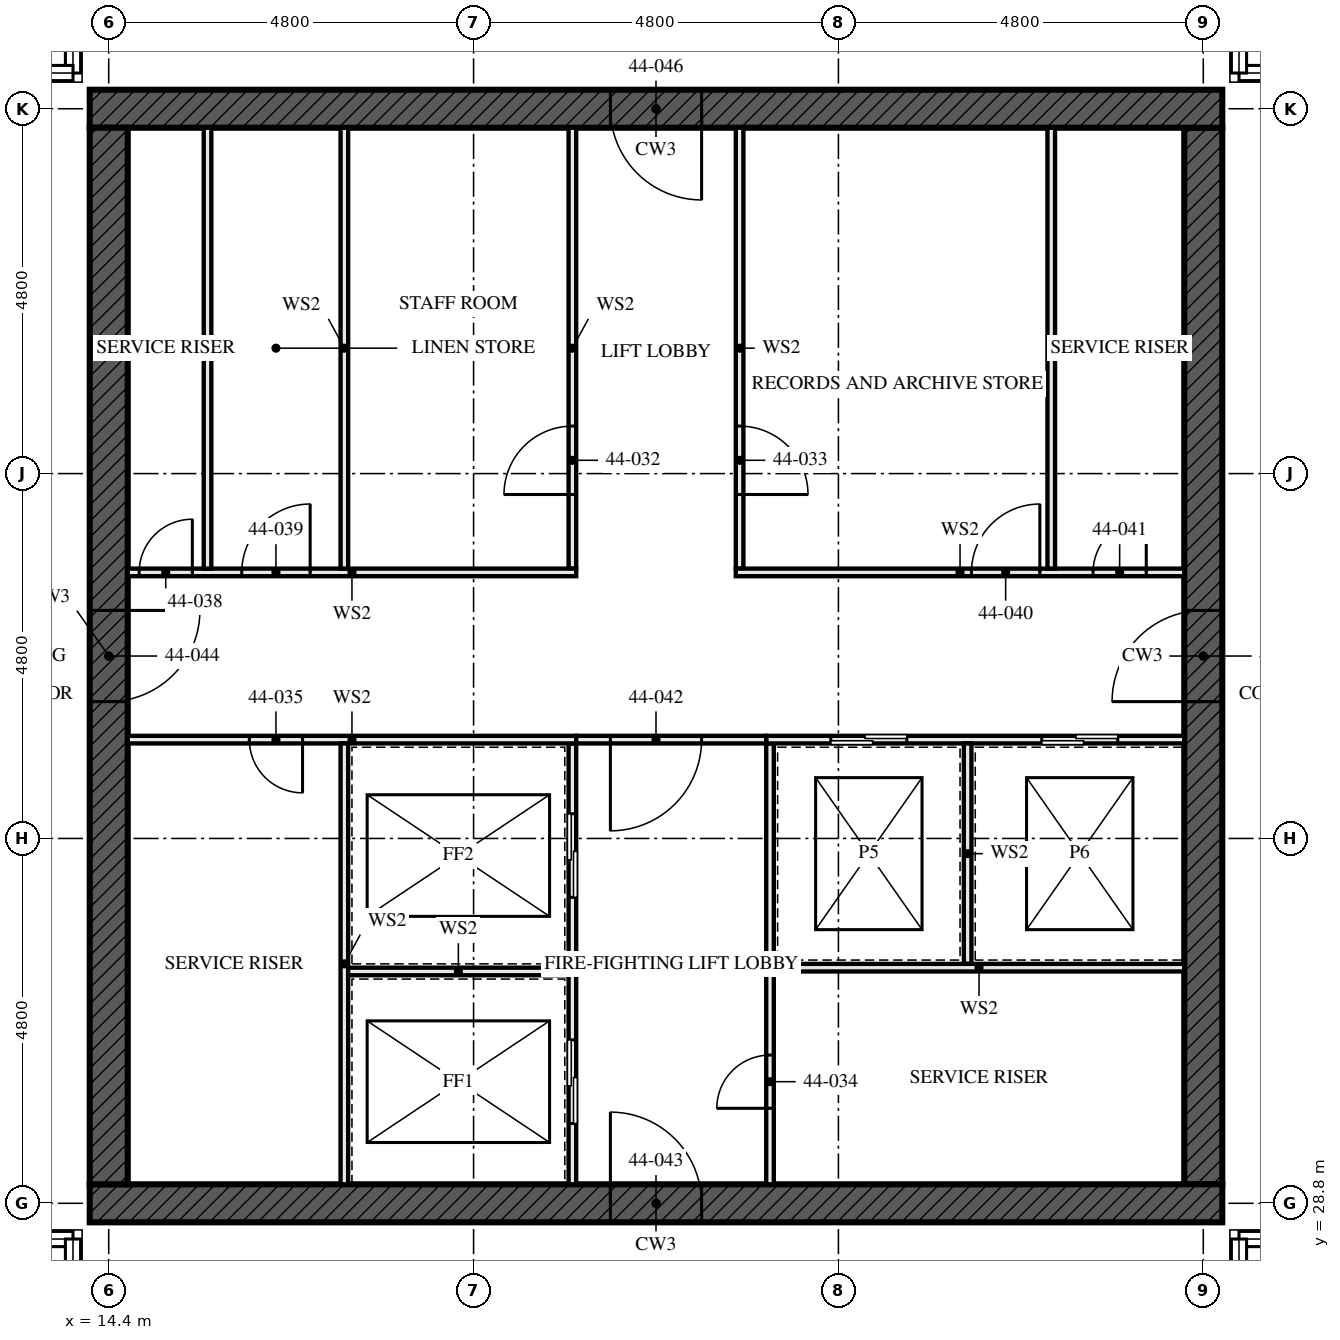
"""IFC4 building model, lengths in metres.
Left out: names, types, materials, properties, quantities, classifications, styles, units other than length and angle.
Written with IfcOpenShell. Run it as: python <this file> out.ifc"""

import sys

from ifc_helpers import new_model, si_unit, direction, frame, frame_2d, origin, place, context, subcontext, project, spatial, rectangle, extrude, element, fill, save


model = new_model("IFC4")
c1 = context("Model", 3, precision=1e-05, world=origin(), true_north=direction((0.0, 1.0)))
c2 = subcontext(c1, "Body", "Model", "MODEL_VIEW")
j1 = project(units=[si_unit("LENGTHUNIT", "METRE"), si_unit("PLANEANGLEUNIT", "RADIAN")], contexts=[c1])
p1 = place(None, origin())
s1 = spatial("IfcSite", under=j1, at=p1, CompositionType="ELEMENT")
p2 = place(p1, origin())
s2 = spatial("IfcBuilding", under=s1, at=p2, CompositionType="ELEMENT")
p3 = place(p2, frame((0.0, 0.0, 162.0)))
s3 = spatial("IfcBuildingStorey", under=s2, at=p3, CompositionType="ELEMENT", Elevation=162.0)
p4 = place(p3, frame((14.15, 28.8, -0.17), z_axis=(0.0, 0.0, 1.0), x_axis=(1.0, 0.0, 0.0)))
e1 = element("IfcWall", 1, at=p4, inside=s3, PredefinedType="SHEAR", context=c2, shape_type="SweptSolid", body=[
    extrude(rectangle(XDim=14.9, YDim=0.5, at=frame_2d((7.45, 0.0))), origin(), (0.0, 0.0, 1.0), 3.5),
])
p5 = place(p4, frame((6.85, 0.0, 0.17)))
e2 = element("IfcOpeningElement", 2, at=p5, cuts=e1, PredefinedType="OPENING", context=c2, shape_type="SweptSolid", body=[
    extrude(rectangle(XDim=1.2, YDim=2.1, at=frame_2d((0.6, 1.05))), frame((0.0, 0.26, 0.0), z_axis=(0.0, -1.0, 0.0), x_axis=(1.0, 0.0, 0.0)), (0.0, 0.0, 1.0), 0.521),
])
p6 = place(p3, frame((29.05, 43.2, -0.17), z_axis=(0.0, 0.0, 1.0), x_axis=(-1.0, 0.0, 0.0)))
e3 = element("IfcWall", 3, at=p6, inside=s3, PredefinedType="SHEAR", context=c2, shape_type="SweptSolid", body=[
    extrude(rectangle(XDim=14.9, YDim=0.5, at=frame_2d((7.45, 0.0))), origin(), (0.0, 0.0, 1.0), 3.5),
])
p7 = place(p6, frame((6.85, 0.0, 0.17)))
e4 = element("IfcOpeningElement", 4, at=p7, cuts=e3, PredefinedType="OPENING", context=c2, shape_type="SweptSolid", body=[
    extrude(rectangle(XDim=1.2, YDim=2.1, at=frame_2d((0.6, 1.05))), frame((0.0, 0.26, 0.0), z_axis=(0.0, -1.0, 0.0), x_axis=(1.0, 0.0, 0.0)), (0.0, 0.0, 1.0), 0.521),
])
p8 = place(p3, frame((14.4, 42.95, -0.17), z_axis=(0.0, 0.0, 1.0), x_axis=(0.0, -1.0, 0.0)))
e5 = element("IfcWall", 5, at=p8, inside=s3, PredefinedType="SHEAR", context=c2, shape_type="SweptSolid", body=[
    extrude(rectangle(XDim=13.9, YDim=0.5, at=frame_2d((6.95, 0.0))), origin(), (0.0, 0.0, 1.0), 3.5),
])
p9 = place(p8, frame((6.35, 0.0, 0.17)))
e6 = element("IfcOpeningElement", 6, at=p9, cuts=e5, PredefinedType="OPENING", context=c2, shape_type="SweptSolid", body=[
    extrude(rectangle(XDim=1.2, YDim=2.1, at=frame_2d((0.6, 1.05))), frame((0.0, 0.26, 0.0), z_axis=(0.0, -1.0, 0.0), x_axis=(1.0, 0.0, 0.0)), (0.0, 0.0, 1.0), 0.521),
])
p10 = place(p3, frame((28.8, 29.05, -0.17), z_axis=(0.0, 0.0, 1.0), x_axis=(0.0, 1.0, 0.0)))
e7 = element("IfcWall", 7, at=p10, inside=s3, PredefinedType="SHEAR", context=c2, shape_type="SweptSolid", body=[
    extrude(rectangle(XDim=13.9, YDim=0.5, at=frame_2d((6.95, 0.0))), origin(), (0.0, 0.0, 1.0), 3.5),
])
p11 = place(p10, frame((6.35, 0.0, 0.17)))
e8 = element("IfcOpeningElement", 8, at=p11, cuts=e7, PredefinedType="OPENING", context=c2, shape_type="SweptSolid", body=[
    extrude(rectangle(XDim=1.2, YDim=2.1, at=frame_2d((0.6, 1.05))), frame((0.0, 0.26, 0.0), z_axis=(0.0, -1.0, 0.0), x_axis=(1.0, 0.0, 0.0)), (0.0, 0.0, 1.0), 0.521),
])
for number, where, z_axis, x_axis in (
    (9, (15.7, 37.15, 0.0), (0.0, 0.0, 1.0), (0.0, 1.0, 0.0)),
    (10, (26.8, 37.15, 0.0), (0.0, 0.0, 1.0), (0.0, 1.0, 0.0)),
):
    element("IfcWall", number, at=place(p3, frame(where, z_axis=z_axis, x_axis=x_axis)), inside=s3, PredefinedType="SOLIDWALL", context=c2, shape_type="SweptSolid", body=[
        extrude(rectangle(XDim=5.8, YDim=0.1, at=frame_2d((2.9, 0.0))), origin(), (0.0, 0.0, 1.0), 3.33),
    ])
p12 = place(p3, frame((20.5, 29.05, 0.0), z_axis=(0.0, 0.0, 1.0), x_axis=(0.0, 1.0, 0.0)))
e11 = element("IfcWall", 11, at=p12, inside=s3, PredefinedType="SOLIDWALL", context=c2, shape_type="SweptSolid", body=[
    extrude(rectangle(XDim=5.8, YDim=0.1, at=frame_2d((2.9, 0.0))), origin(), (0.0, 0.0, 1.0), 3.33),
])
p13 = place(p12, frame((0.8, 0.0, 0.0)))
e12 = element("IfcOpeningElement", 12, at=p13, cuts=e11, PredefinedType="OPENING", context=c2, shape_type="SweptSolid", body=[
    extrude(rectangle(XDim=1.1, YDim=2.3, at=frame_2d((0.55, 1.15))), frame((0.0, 0.061, 0.0), z_axis=(0.0, -1.0, 0.0), x_axis=(1.0, 0.0, 0.0)), (0.0, 0.0, 1.0), 0.121),
])
p14 = place(p12, frame((3.775, 0.0, 0.0)))
e13 = element("IfcOpeningElement", 13, at=p14, cuts=e11, PredefinedType="OPENING", context=c2, shape_type="SweptSolid", body=[
    extrude(rectangle(XDim=1.1, YDim=2.3, at=frame_2d((0.55, 1.15))), frame((0.0, 0.061, 0.0), z_axis=(0.0, -1.0, 0.0), x_axis=(1.0, 0.0, 0.0)), (0.0, 0.0, 1.0), 0.121),
])
p15 = place(p3, frame((20.5, 37.15, 0.0), z_axis=(0.0, 0.0, 1.0), x_axis=(0.0, 1.0, 0.0)))
e14 = element("IfcWall", 14, at=p15, inside=s3, PredefinedType="SOLIDWALL", context=c2, shape_type="SweptSolid", body=[
    extrude(rectangle(XDim=5.8, YDim=0.1, at=frame_2d((2.9, 0.0))), origin(), (0.0, 0.0, 1.0), 3.33),
])
p16 = place(p15, frame((0.975, 0.0, 0.0)))
e15 = element("IfcOpeningElement", 15, at=p16, cuts=e14, PredefinedType="OPENING", context=c2, shape_type="SweptSolid", body=[
    extrude(rectangle(XDim=0.9, YDim=2.1, at=frame_2d((0.45, 1.05))), frame((0.0, 0.061, 0.0), z_axis=(0.0, -1.0, 0.0), x_axis=(1.0, 0.0, 0.0)), (0.0, 0.0, 1.0), 0.121),
])
p17 = place(p3, frame((22.7, 37.15, 0.0), z_axis=(0.0, 0.0, 1.0), x_axis=(0.0, 1.0, 0.0)))
e16 = element("IfcWall", 16, at=p17, inside=s3, PredefinedType="SOLIDWALL", context=c2, shape_type="SweptSolid", body=[
    extrude(rectangle(XDim=5.8, YDim=0.1, at=frame_2d((2.9, 0.0))), origin(), (0.0, 0.0, 1.0), 3.33),
])
p18 = place(p17, frame((0.975, 0.0, 0.0)))
e17 = element("IfcOpeningElement", 17, at=p18, cuts=e16, PredefinedType="OPENING", context=c2, shape_type="SweptSolid", body=[
    extrude(rectangle(XDim=0.9, YDim=2.1, at=frame_2d((0.45, 1.05))), frame((0.0, 0.061, 0.0), z_axis=(0.0, -1.0, 0.0), x_axis=(1.0, 0.0, 0.0)), (0.0, 0.0, 1.0), 0.121),
])
p19 = place(p3, frame((23.1, 29.05, 0.0), z_axis=(0.0, 0.0, 1.0), x_axis=(0.0, 1.0, 0.0)))
e18 = element("IfcWall", 18, at=p19, inside=s3, PredefinedType="SOLIDWALL", context=c2, shape_type="SweptSolid", body=[
    extrude(rectangle(XDim=5.8, YDim=0.1, at=frame_2d((2.9, 0.0))), origin(), (0.0, 0.0, 1.0), 3.33),
])
p20 = place(p19, frame((1.0, 0.0, 0.0)))
e19 = element("IfcOpeningElement", 19, at=p20, cuts=e18, PredefinedType="OPENING", context=c2, shape_type="SweptSolid", body=[
    extrude(rectangle(XDim=0.7, YDim=2.1, at=frame_2d((0.35, 1.05))), frame((0.0, 0.061, 0.0), z_axis=(0.0, -1.0, 0.0), x_axis=(1.0, 0.0, 0.0)), (0.0, 0.0, 1.0), 0.121),
])
p21 = place(p3, frame((14.65, 34.9, 0.0), z_axis=(0.0, 0.0, 1.0), x_axis=(1.0, 0.0, 0.0)))
e20 = element("IfcWall", 20, at=p21, inside=s3, PredefinedType="SOLIDWALL", context=c2, shape_type="SweptSolid", body=[
    extrude(rectangle(XDim=5.9, YDim=0.1, at=frame_2d((2.95, 0.0))), origin(), (0.0, 0.0, 1.0), 3.33),
])
p22 = place(p21, frame((1.6, 0.0, 0.0)))
e21 = element("IfcOpeningElement", 21, at=p22, cuts=e20, PredefinedType="OPENING", context=c2, shape_type="SweptSolid", body=[
    extrude(rectangle(XDim=0.7, YDim=2.1, at=frame_2d((0.35, 1.05))), frame((0.0, 0.061, 0.0), z_axis=(0.0, -1.0, 0.0), x_axis=(1.0, 0.0, 0.0)), (0.0, 0.0, 1.0), 0.121),
])
p23 = place(p3, frame((23.05, 34.9, 0.0), z_axis=(0.0, 0.0, 1.0), x_axis=(1.0, 0.0, 0.0)))
e22 = element("IfcWall", 22, at=p23, inside=s3, PredefinedType="SOLIDWALL", context=c2, shape_type="SweptSolid", body=[
    extrude(rectangle(XDim=5.5, YDim=0.1, at=frame_2d((2.75, 0.0))), origin(), (0.0, 0.0, 1.0), 3.33),
])
p24 = place(p23, frame((0.85, 0.0, 0.0)))
e23 = element("IfcOpeningElement", 23, at=p24, cuts=e22, PredefinedType="OPENING", context=c2, shape_type="SweptSolid", body=[
    extrude(rectangle(XDim=1.0, YDim=2.1, at=frame_2d((0.5, 1.05))), frame((0.0, 0.061, 0.0), z_axis=(0.0, -1.0, 0.0), x_axis=(1.0, 0.0, 0.0)), (0.0, 0.0, 1.0), 0.121),
])
p25 = place(p23, frame((3.625, 0.0, 0.0)))
e24 = element("IfcOpeningElement", 24, at=p25, cuts=e22, PredefinedType="OPENING", context=c2, shape_type="SweptSolid", body=[
    extrude(rectangle(XDim=1.0, YDim=2.1, at=frame_2d((0.5, 1.05))), frame((0.0, 0.061, 0.0), z_axis=(0.0, -1.0, 0.0), x_axis=(1.0, 0.0, 0.0)), (0.0, 0.0, 1.0), 0.121),
])
p26 = place(p3, frame((14.65, 37.1, 0.0), z_axis=(0.0, 0.0, 1.0), x_axis=(1.0, 0.0, 0.0)))
e25 = element("IfcWall", 25, at=p26, inside=s3, PredefinedType="SOLIDWALL", context=c2, shape_type="SweptSolid", body=[
    extrude(rectangle(XDim=5.9, YDim=0.1, at=frame_2d((2.95, 0.0))), origin(), (0.0, 0.0, 1.0), 3.33),
])
p27 = place(p26, frame((0.15, 0.0, 0.0)))
e26 = element("IfcOpeningElement", 26, at=p27, cuts=e25, PredefinedType="OPENING", context=c2, shape_type="SweptSolid", body=[
    extrude(rectangle(XDim=0.7, YDim=2.1, at=frame_2d((0.35, 1.05))), frame((0.0, 0.061, 0.0), z_axis=(0.0, -1.0, 0.0), x_axis=(1.0, 0.0, 0.0)), (0.0, 0.0, 1.0), 0.121),
])
p28 = place(p26, frame((1.5, 0.0, 0.0)))
e27 = element("IfcOpeningElement", 27, at=p28, cuts=e25, PredefinedType="OPENING", context=c2, shape_type="SweptSolid", body=[
    extrude(rectangle(XDim=0.9, YDim=2.1, at=frame_2d((0.45, 1.05))), frame((0.0, 0.061, 0.0), z_axis=(0.0, -1.0, 0.0), x_axis=(1.0, 0.0, 0.0)), (0.0, 0.0, 1.0), 0.121),
])
p29 = place(p3, frame((22.65, 37.1, 0.0), z_axis=(0.0, 0.0, 1.0), x_axis=(1.0, 0.0, 0.0)))
e28 = element("IfcWall", 28, at=p29, inside=s3, PredefinedType="SOLIDWALL", context=c2, shape_type="SweptSolid", body=[
    extrude(rectangle(XDim=5.9, YDim=0.1, at=frame_2d((2.95, 0.0))), origin(), (0.0, 0.0, 1.0), 3.33),
])
p30 = place(p29, frame((3.1, 0.0, 0.0)))
e29 = element("IfcOpeningElement", 29, at=p30, cuts=e28, PredefinedType="OPENING", context=c2, shape_type="SweptSolid", body=[
    extrude(rectangle(XDim=0.9, YDim=2.1, at=frame_2d((0.45, 1.05))), frame((0.0, 0.061, 0.0), z_axis=(0.0, -1.0, 0.0), x_axis=(1.0, 0.0, 0.0)), (0.0, 0.0, 1.0), 0.121),
])
p31 = place(p29, frame((4.7, 0.0, 0.0)))
e30 = element("IfcOpeningElement", 30, at=p31, cuts=e28, PredefinedType="OPENING", context=c2, shape_type="SweptSolid", body=[
    extrude(rectangle(XDim=0.7, YDim=2.1, at=frame_2d((0.35, 1.05))), frame((0.0, 0.061, 0.0), z_axis=(0.0, -1.0, 0.0), x_axis=(1.0, 0.0, 0.0)), (0.0, 0.0, 1.0), 0.121),
])
p32 = place(p3, frame((20.55, 34.9, 0.0), z_axis=(0.0, 0.0, 1.0), x_axis=(1.0, 0.0, 0.0)))
e31 = element("IfcWall", 31, at=p32, inside=s3, PredefinedType="SOLIDWALL", context=c2, shape_type="SweptSolid", body=[
    extrude(rectangle(XDim=2.5, YDim=0.1, at=frame_2d((1.25, 0.0))), origin(), (0.0, 0.0, 1.0), 3.33),
])
p33 = place(p32, frame((0.45, 0.0, 0.0)))
e32 = element("IfcOpeningElement", 32, at=p33, cuts=e31, PredefinedType="OPENING", context=c2, shape_type="SweptSolid", body=[
    extrude(rectangle(XDim=1.2, YDim=2.1, at=frame_2d((0.6, 1.05))), frame((0.0, 0.061, 0.0), z_axis=(0.0, -1.0, 0.0), x_axis=(1.0, 0.0, 0.0)), (0.0, 0.0, 1.0), 0.121),
])
p34 = place(p3, frame((17.5, 29.05, 0.0), z_axis=(0.0, 0.0, 1.0), x_axis=(0.0, 1.0, 0.0)))
e33 = element("IfcWall", 33, at=p34, inside=s3, PredefinedType="SOLIDWALL", context=c2, shape_type="SweptSolid", body=[
    extrude(rectangle(XDim=5.8, YDim=0.1, at=frame_2d((2.9, 0.0))), origin(), (0.0, 0.0, 1.0), 3.33),
])
p35 = place(p3, frame((17.55, 31.85, 0.0), z_axis=(0.0, 0.0, 1.0), x_axis=(1.0, 0.0, 0.0)))
e34 = element("IfcWall", 34, at=p35, inside=s3, PredefinedType="SOLIDWALL", context=c2, shape_type="SweptSolid", body=[
    extrude(rectangle(XDim=2.9, YDim=0.1, at=frame_2d((1.45, 0.0))), origin(), (0.0, 0.0, 1.0), 3.33),
])
p36 = place(p3, frame((17.5, 37.15, 0.0), z_axis=(0.0, 0.0, 1.0), x_axis=(0.0, 1.0, 0.0)))
e35 = element("IfcWall", 35, at=p36, inside=s3, PredefinedType="SOLIDWALL", context=c2, shape_type="SweptSolid", body=[
    extrude(rectangle(XDim=5.8, YDim=0.1, at=frame_2d((2.9, 0.0))), origin(), (0.0, 0.0, 1.0), 3.33),
])
p37 = place(p3, frame((25.7, 31.95, 0.0), z_axis=(0.0, 0.0, 1.0), x_axis=(0.0, 1.0, 0.0)))
e36 = element("IfcWall", 36, at=p37, inside=s3, PredefinedType="SOLIDWALL", context=c2, shape_type="SweptSolid", body=[
    extrude(rectangle(XDim=2.9, YDim=0.1, at=frame_2d((1.45, 0.0))), origin(), (0.0, 0.0, 1.0), 3.33),
])
p38 = place(p3, frame((23.15, 31.9, 0.0), z_axis=(0.0, 0.0, 1.0), x_axis=(1.0, 0.0, 0.0)))
e37 = element("IfcWall", 37, at=p38, inside=s3, PredefinedType="SOLIDWALL", context=c2, shape_type="SweptSolid", body=[
    extrude(rectangle(XDim=5.4, YDim=0.1, at=frame_2d((2.7, 0.0))), origin(), (0.0, 0.0, 1.0), 3.33),
])
p39 = place(p13, origin())
e38 = element("IfcDoor", 38, at=p39, inside=s3, OperationType="SLIDING_TO_LEFT", PredefinedType="DOOR", context=c2, shape_type="SweptSolid", body=[
    extrude(rectangle(XDim=1.1, YDim=2.3, at=frame_2d((0.55, 1.15))), frame((0.0, 0.05, 0.0), z_axis=(0.0, -1.0, 0.0), x_axis=(1.0, 0.0, 0.0)), (0.0, 0.0, 1.0), 0.1),
])
fill(e12, e38)
p40 = place(p14, origin())
e39 = element("IfcDoor", 39, at=p40, inside=s3, OperationType="SLIDING_TO_LEFT", PredefinedType="DOOR", context=c2, shape_type="SweptSolid", body=[
    extrude(rectangle(XDim=1.1, YDim=2.3, at=frame_2d((0.55, 1.15))), frame((0.0, 0.05, 0.0), z_axis=(0.0, -1.0, 0.0), x_axis=(1.0, 0.0, 0.0)), (0.0, 0.0, 1.0), 0.1),
])
fill(e13, e39)
p41 = place(p16, origin())
e40 = element("IfcDoor", 40, at=p41, inside=s3, OperationType="SINGLE_SWING_RIGHT", PredefinedType="DOOR", context=c2, shape_type="SweptSolid", body=[
    extrude(rectangle(XDim=0.9, YDim=2.1, at=frame_2d((0.45, 1.05))), frame((0.0, 0.027, 0.0), z_axis=(0.0, -1.0, 0.0), x_axis=(1.0, 0.0, 0.0)), (0.0, 0.0, 1.0), 0.054),
])
fill(e15, e40)
p42 = place(p18, frame((0.9, 0.0, 0.0), z_axis=(0.0, 0.0, 1.0), x_axis=(-1.0, 0.0, 0.0)))
e41 = element("IfcDoor", 41, at=p42, inside=s3, OperationType="SINGLE_SWING_LEFT", PredefinedType="DOOR", context=c2, shape_type="SweptSolid", body=[
    extrude(rectangle(XDim=0.9, YDim=2.1, at=frame_2d((0.45, 1.05))), frame((0.0, 0.027, 0.0), z_axis=(0.0, -1.0, 0.0), x_axis=(1.0, 0.0, 0.0)), (0.0, 0.0, 1.0), 0.054),
])
fill(e17, e41)
p43 = place(p20, origin())
e42 = element("IfcDoor", 42, at=p43, inside=s3, OperationType="SINGLE_SWING_RIGHT", PredefinedType="DOOR", context=c2, shape_type="SweptSolid", body=[
    extrude(rectangle(XDim=0.7, YDim=2.1, at=frame_2d((0.35, 1.05))), frame((0.0, 0.027, 0.0), z_axis=(0.0, -1.0, 0.0), x_axis=(1.0, 0.0, 0.0)), (0.0, 0.0, 1.0), 0.054),
])
fill(e19, e42)
p44 = place(p22, frame((0.7, 0.0, 0.0), z_axis=(0.0, 0.0, 1.0), x_axis=(-1.0, 0.0, 0.0)))
e43 = element("IfcDoor", 43, at=p44, inside=s3, OperationType="SINGLE_SWING_RIGHT", PredefinedType="DOOR", context=c2, shape_type="SweptSolid", body=[
    extrude(rectangle(XDim=0.7, YDim=2.1, at=frame_2d((0.35, 1.05))), frame((0.0, 0.027, 0.0), z_axis=(0.0, -1.0, 0.0), x_axis=(1.0, 0.0, 0.0)), (0.0, 0.0, 1.0), 0.054),
])
fill(e21, e43)
p45 = place(p24, origin())
e44 = element("IfcDoor", 44, at=p45, inside=s3, OperationType="SLIDING_TO_LEFT", PredefinedType="DOOR", context=c2, shape_type="SweptSolid", body=[
    extrude(rectangle(XDim=1.0, YDim=2.1, at=frame_2d((0.5, 1.05))), frame((0.0, 0.05, 0.0), z_axis=(0.0, -1.0, 0.0), x_axis=(1.0, 0.0, 0.0)), (0.0, 0.0, 1.0), 0.1),
])
fill(e23, e44)
p46 = place(p25, origin())
e45 = element("IfcDoor", 45, at=p46, inside=s3, OperationType="SLIDING_TO_LEFT", PredefinedType="DOOR", context=c2, shape_type="SweptSolid", body=[
    extrude(rectangle(XDim=1.0, YDim=2.1, at=frame_2d((0.5, 1.05))), frame((0.0, 0.05, 0.0), z_axis=(0.0, -1.0, 0.0), x_axis=(1.0, 0.0, 0.0)), (0.0, 0.0, 1.0), 0.1),
])
fill(e24, e45)
p47 = place(p27, origin())
e46 = element("IfcDoor", 46, at=p47, inside=s3, OperationType="SINGLE_SWING_LEFT", PredefinedType="DOOR", context=c2, shape_type="SweptSolid", body=[
    extrude(rectangle(XDim=0.7, YDim=2.1, at=frame_2d((0.35, 1.05))), frame((0.0, 0.027, 0.0), z_axis=(0.0, -1.0, 0.0), x_axis=(1.0, 0.0, 0.0)), (0.0, 0.0, 1.0), 0.054),
])
fill(e26, e46)
p48 = place(p28, origin())
e47 = element("IfcDoor", 47, at=p48, inside=s3, OperationType="SINGLE_SWING_LEFT", PredefinedType="DOOR", context=c2, shape_type="SweptSolid", body=[
    extrude(rectangle(XDim=0.9, YDim=2.1, at=frame_2d((0.45, 1.05))), frame((0.0, 0.027, 0.0), z_axis=(0.0, -1.0, 0.0), x_axis=(1.0, 0.0, 0.0)), (0.0, 0.0, 1.0), 0.054),
])
fill(e27, e47)
p49 = place(p30, origin())
e48 = element("IfcDoor", 48, at=p49, inside=s3, OperationType="SINGLE_SWING_LEFT", PredefinedType="DOOR", context=c2, shape_type="SweptSolid", body=[
    extrude(rectangle(XDim=0.9, YDim=2.1, at=frame_2d((0.45, 1.05))), frame((0.0, 0.027, 0.0), z_axis=(0.0, -1.0, 0.0), x_axis=(1.0, 0.0, 0.0)), (0.0, 0.0, 1.0), 0.054),
])
fill(e29, e48)
p50 = place(p31, origin())
e49 = element("IfcDoor", 49, at=p50, inside=s3, OperationType="SINGLE_SWING_LEFT", PredefinedType="DOOR", context=c2, shape_type="SweptSolid", body=[
    extrude(rectangle(XDim=0.7, YDim=2.1, at=frame_2d((0.35, 1.05))), frame((0.0, 0.027, 0.0), z_axis=(0.0, -1.0, 0.0), x_axis=(1.0, 0.0, 0.0)), (0.0, 0.0, 1.0), 0.054),
])
fill(e30, e49)
p51 = place(p33, frame((1.2, 0.0, 0.0), z_axis=(0.0, 0.0, 1.0), x_axis=(-1.0, 0.0, 0.0)))
e50 = element("IfcDoor", 50, at=p51, inside=s3, OperationType="SINGLE_SWING_LEFT", PredefinedType="DOOR", context=c2, shape_type="SweptSolid", body=[
    extrude(rectangle(XDim=1.2, YDim=2.1, at=frame_2d((0.6, 1.05))), frame((0.0, 0.027, 0.0), z_axis=(0.0, -1.0, 0.0), x_axis=(1.0, 0.0, 0.0)), (0.0, 0.0, 1.0), 0.054),
])
fill(e32, e50)
p52 = place(p5, origin())
e51 = element("IfcDoor", 51, at=p52, inside=s3, OperationType="SINGLE_SWING_LEFT", PredefinedType="DOOR", context=c2, shape_type="SweptSolid", body=[
    extrude(rectangle(XDim=1.2, YDim=2.1, at=frame_2d((0.6, 1.05))), frame((0.0, 0.027, 0.0), z_axis=(0.0, -1.0, 0.0), x_axis=(1.0, 0.0, 0.0)), (0.0, 0.0, 1.0), 0.054),
])
fill(e2, e51)
p53 = place(p9, origin())
e52 = element("IfcDoor", 52, at=p53, inside=s3, OperationType="SINGLE_SWING_LEFT", PredefinedType="DOOR", context=c2, shape_type="SweptSolid", body=[
    extrude(rectangle(XDim=1.2, YDim=2.1, at=frame_2d((0.6, 1.05))), frame((0.0, 0.027, 0.0), z_axis=(0.0, -1.0, 0.0), x_axis=(1.0, 0.0, 0.0)), (0.0, 0.0, 1.0), 0.054),
])
fill(e6, e52)
p54 = place(p11, origin())
e53 = element("IfcDoor", 53, at=p54, inside=s3, OperationType="SINGLE_SWING_LEFT", PredefinedType="DOOR", context=c2, shape_type="SweptSolid", body=[
    extrude(rectangle(XDim=1.2, YDim=2.1, at=frame_2d((0.6, 1.05))), frame((0.0, 0.027, 0.0), z_axis=(0.0, -1.0, 0.0), x_axis=(1.0, 0.0, 0.0)), (0.0, 0.0, 1.0), 0.054),
])
fill(e8, e53)
p55 = place(p7, origin())
e54 = element("IfcDoor", 54, at=p55, inside=s3, OperationType="SINGLE_SWING_LEFT", PredefinedType="DOOR", context=c2, shape_type="SweptSolid", body=[
    extrude(rectangle(XDim=1.2, YDim=2.1, at=frame_2d((0.6, 1.05))), frame((0.0, 0.027, 0.0), z_axis=(0.0, -1.0, 0.0), x_axis=(1.0, 0.0, 0.0)), (0.0, 0.0, 1.0), 0.054),
])
fill(e4, e54)
save(model, sys.argv[1])
